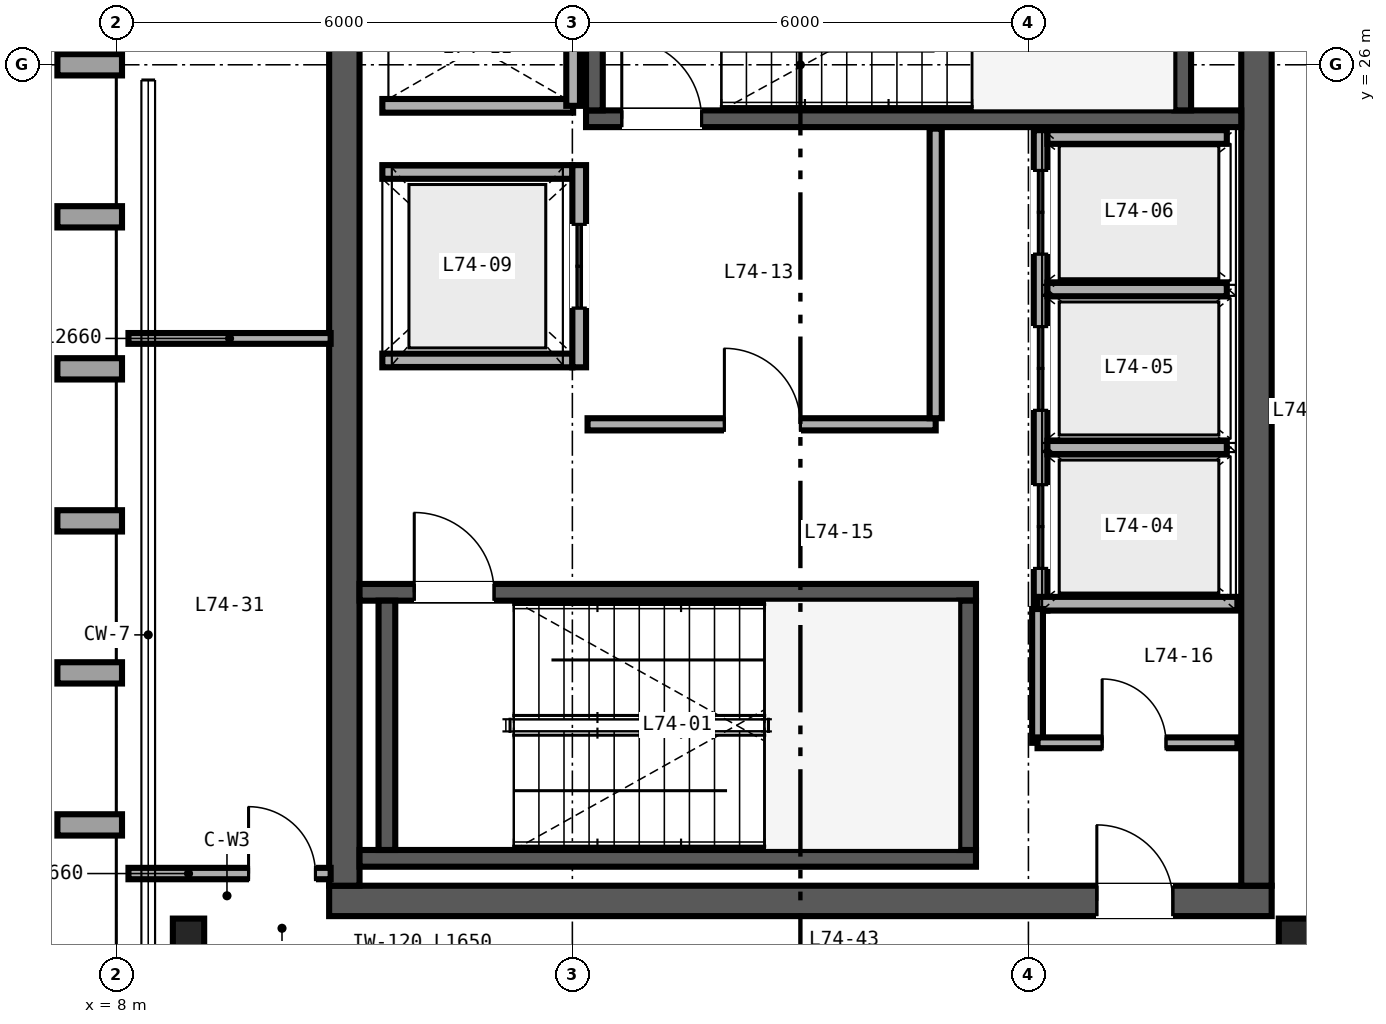
"""IFC4 building model, lengths in metres.
Left out: names, types, materials, properties, quantities, classifications, styles, units other than length and angle.
Written with IfcOpenShell. Run it as: python <this file> out.ifc"""

import sys

from ifc_helpers import new_model, si_unit, direction, frame, frame_2d, origin, origin_2d, place, context, subcontext, project, spatial, rectangle, i_section, extrude, source, transform, mapped, element, fill, save


model = new_model("IFC4")
c1 = context("Model", 3, precision=1e-05, world=origin(), true_north=direction((0.0, 1.0)))
c2 = subcontext(c1, "Body", "Model", "MODEL_VIEW")
j1 = project(units=[si_unit("LENGTHUNIT", "METRE"), si_unit("PLANEANGLEUNIT", "RADIAN")], contexts=[c1])
p1 = place(None, origin())
s1 = spatial("IfcSite", under=j1, at=p1, CompositionType="ELEMENT")
p2 = place(p1, origin())
s2 = spatial("IfcBuilding", under=s1, at=p2, CompositionType="ELEMENT")
p3 = place(p2, frame((0.0, 0.0, 290.4)))
s3 = spatial("IfcBuildingStorey", under=s2, at=p3, CompositionType="ELEMENT", Elevation=290.4)
p4 = place(p3, frame((10.8, 15.0, 0.0), z_axis=(0.0, 0.0, 1.0), x_axis=(1.0, 0.0, 0.0)))
e1 = element("IfcWall", 1, at=p4, inside=s3, PredefinedType="SHEAR", context=c2, shape_type="SweptSolid", body=[
    extrude(rectangle(XDim=12.4, YDim=0.4, at=frame_2d((6.2, 0.0))), origin(), (0.0, 0.0, 1.0), 3.38),
])
p5 = place(p4, frame((10.1, 0.0, 0.0)))
e2 = element("IfcOpeningElement", 2, at=p5, cuts=e1, PredefinedType="OPENING", context=c2, shape_type="SweptSolid", body=[
    extrude(rectangle(XDim=1.0, YDim=2.15, at=frame_2d((0.5, 1.075))), frame((0.0, 0.21, 0.0), z_axis=(0.0, -1.0, 0.0), x_axis=(1.0, 0.0, 0.0)), (0.0, 0.0, 1.0), 0.42),
])
for number, where, z_axis, x_axis in (
    (3, (11.0, 15.2, 0.0), (0.0, 0.0, 1.0), (0.0, 1.0, 0.0)),
    (4, (23.0, 15.2, 0.0), (0.0, 0.0, 1.0), (0.0, 1.0, 0.0)),
):
    element("IfcWall", number, at=place(p3, frame(where, z_axis=z_axis, x_axis=x_axis)), inside=s3, PredefinedType="SHEAR", context=c2, shape_type="SweptSolid", body=[
        extrude(rectangle(XDim=21.6, YDim=0.4, at=frame_2d((10.8, 0.0))), origin(), (0.0, 0.0, 1.0), 3.38),
    ])
p6 = place(p3, frame((11.2, 15.56, 0.0), z_axis=(0.0, 0.0, 1.0), x_axis=(1.0, 0.0, 0.0)))
e5 = element("IfcWall", 5, at=p6, inside=s3, PredefinedType="SHEAR", context=c2, shape_type="SweptSolid", body=[
    extrude(rectangle(XDim=8.11, YDim=0.22, at=frame_2d((4.055, 0.0))), origin(), (0.0, 0.0, 1.0), 3.4),
])
p7 = place(p3, frame((11.2, 19.06, 0.0), z_axis=(0.0, 0.0, 1.0), x_axis=(1.0, 0.0, 0.0)))
e6 = element("IfcWall", 6, at=p7, inside=s3, PredefinedType="SHEAR", context=c2, shape_type="SweptSolid", body=[
    extrude(rectangle(XDim=8.11, YDim=0.22, at=frame_2d((4.055, 0.0))), origin(), (0.0, 0.0, 1.0), 3.4),
])
p8 = place(p7, frame((0.72, 0.0, 0.0)))
e7 = element("IfcOpeningElement", 7, at=p8, cuts=e6, PredefinedType="OPENING", context=c2, shape_type="SweptSolid", body=[
    extrude(rectangle(XDim=1.05, YDim=2.15, at=frame_2d((0.525, 1.075))), frame((0.0, 0.12, 0.0), z_axis=(0.0, -1.0, 0.0), x_axis=(1.0, 0.0, 0.0)), (0.0, 0.0, 1.0), 0.24),
])
for number, where, z_axis, x_axis in (
    (8, (11.56, 15.67, 0.0), (0.0, 0.0, 1.0), (0.0, 1.0, 0.0)),
    (9, (19.2, 15.67, 0.0), (0.0, 0.0, 1.0), (0.0, 1.0, 0.0)),
):
    element("IfcWall", number, at=place(p3, frame(where, z_axis=z_axis, x_axis=x_axis)), inside=s3, PredefinedType="SHEAR", context=c2, shape_type="SweptSolid", body=[
        extrude(rectangle(XDim=3.28, YDim=0.22, at=frame_2d((1.64, 0.0))), origin(), (0.0, 0.0, 1.0), 3.4),
    ])
p9 = place(p3, frame((14.18, 25.29, 0.0), z_axis=(0.0, 0.0, 1.0), x_axis=(1.0, 0.0, 0.0)))
e10 = element("IfcWall", 10, at=p9, inside=s3, PredefinedType="SHEAR", context=c2, shape_type="SweptSolid", body=[
    extrude(rectangle(XDim=8.62, YDim=0.22, at=frame_2d((4.31, 0.0))), origin(), (0.0, 0.0, 1.0), 3.4),
])
p10 = place(p9, frame((0.47, 0.0, 0.0)))
e11 = element("IfcOpeningElement", 11, at=p10, cuts=e10, PredefinedType="OPENING", context=c2, shape_type="SweptSolid", body=[
    extrude(rectangle(XDim=1.05, YDim=2.15, at=frame_2d((0.525, 1.075))), frame((0.0, 0.12, 0.0), z_axis=(0.0, -1.0, 0.0), x_axis=(1.0, 0.0, 0.0)), (0.0, 0.0, 1.0), 0.24),
])
for number, where, z_axis, x_axis in (
    (12, (14.29, 25.4, 0.0), (0.0, 0.0, 1.0), (0.0, 1.0, 0.0)),
    (13, (22.03, 25.4, 0.0), (0.0, 0.0, 1.0), (0.0, 1.0, 0.0)),
):
    element("IfcWall", number, at=place(p3, frame(where, z_axis=z_axis, x_axis=x_axis)), inside=s3, PredefinedType="SHEAR", context=c2, shape_type="SweptSolid", body=[
        extrude(rectangle(XDim=3.28, YDim=0.22, at=frame_2d((1.64, 0.0))), origin(), (0.0, 0.0, 1.0), 3.4),
    ])
m1 = source(origin(), c2, "Body", "SweptSolid", [
    extrude(i_section(OverallWidth=0.412, OverallDepth=0.435, WebThickness=0.036, FlangeThickness=0.057, FilletRadius=0.025, at=origin_2d()), origin(), (0.0, 0.0, 1.0), 3.38),
])
for number, where, z_axis, x_axis in (
    (14, (8.95, 14.55, 0.0), (0.0, 0.0, 1.0), (1.0, 0.0, 0.0)),
    (15, (23.5, 14.55, 0.0), (0.0, 0.0, 1.0), (1.0, 0.0, 0.0)),
):
    element("IfcColumn", number, at=place(p3, frame(where, z_axis=z_axis, x_axis=x_axis)), inside=s3, PredefinedType="COLUMN", context=c2, shape_type="MappedRepresentation", body=[
        mapped(m1, transform((0.0, 0.0, 0.0), scale=1.0)),
    ])
p11 = place(p3, frame((20.16, 18.82, 0.0), z_axis=(0.0, 0.0, 1.0), x_axis=(0.0, 1.0, 0.0)))
e16 = element("IfcWall", 16, at=p11, inside=s3, PredefinedType="SOLIDWALL", context=c2, shape_type="SweptSolid", body=[
    extrude(rectangle(XDim=6.32, YDim=0.18, at=frame_2d((3.16, 0.0))), origin(), (0.0, 0.0, 1.0), 2.48),
])
p12 = place(p11, frame((0.555, 0.0, 0.0)))
e17 = element("IfcOpeningElement", 17, at=p12, cuts=e16, PredefinedType="OPENING", context=c2, shape_type="SweptSolid", body=[
    extrude(rectangle(XDim=1.1, YDim=2.2, at=frame_2d((0.55, 1.1))), frame((0.0, 0.1, 0.0), z_axis=(0.0, -1.0, 0.0), x_axis=(1.0, 0.0, 0.0)), (0.0, 0.0, 1.0), 0.2),
])
p13 = place(p11, frame((2.635, 0.0, 0.0)))
e18 = element("IfcOpeningElement", 18, at=p13, cuts=e16, PredefinedType="OPENING", context=c2, shape_type="SweptSolid", body=[
    extrude(rectangle(XDim=1.1, YDim=2.2, at=frame_2d((0.55, 1.1))), frame((0.0, 0.1, 0.0), z_axis=(0.0, -1.0, 0.0), x_axis=(1.0, 0.0, 0.0)), (0.0, 0.0, 1.0), 0.2),
])
p14 = place(p11, frame((4.69, 0.0, 0.0)))
e19 = element("IfcOpeningElement", 19, at=p14, cuts=e16, PredefinedType="OPENING", context=c2, shape_type="SweptSolid", body=[
    extrude(rectangle(XDim=1.1, YDim=2.2, at=frame_2d((0.55, 1.1))), frame((0.0, 0.1, 0.0), z_axis=(0.0, -1.0, 0.0), x_axis=(1.0, 0.0, 0.0)), (0.0, 0.0, 1.0), 0.2),
])
p15 = place(p3, frame((20.12, 18.91, 0.0), z_axis=(0.0, 0.0, 1.0), x_axis=(1.0, 0.0, 0.0)))
e20 = element("IfcWall", 20, at=p15, inside=s3, PredefinedType="SOLIDWALL", context=c2, shape_type="SweptSolid", body=[
    extrude(rectangle(XDim=2.63, YDim=0.18, at=frame_2d((1.315, 0.0))), origin(), (0.0, 0.0, 1.0), 3.38),
])
p16 = place(p3, frame((20.25, 25.05, 0.0), z_axis=(0.0, 0.0, 1.0), x_axis=(1.0, 0.0, 0.0)))
e21 = element("IfcWall", 21, at=p16, inside=s3, PredefinedType="SOLIDWALL", context=c2, shape_type="SweptSolid", body=[
    extrude(rectangle(XDim=2.36, YDim=0.18, at=frame_2d((1.18, 0.0))), origin(), (0.0, 0.0, 1.0), 3.38),
])
p17 = place(p3, frame((20.25, 20.965, 0.0), z_axis=(0.0, 0.0, 1.0), x_axis=(1.0, 0.0, 0.0)))
e22 = element("IfcWall", 22, at=p17, inside=s3, PredefinedType="SOLIDWALL", context=c2, shape_type="SweptSolid", body=[
    extrude(rectangle(XDim=2.36, YDim=0.18, at=frame_2d((1.18, 0.0))), origin(), (0.0, 0.0, 1.0), 2.48),
])
p18 = place(p3, frame((20.25, 23.045, 0.0), z_axis=(0.0, 0.0, 1.0), x_axis=(1.0, 0.0, 0.0)))
e23 = element("IfcWall", 23, at=p18, inside=s3, PredefinedType="SOLIDWALL", context=c2, shape_type="SweptSolid", body=[
    extrude(rectangle(XDim=2.36, YDim=0.18, at=frame_2d((1.18, 0.0))), origin(), (0.0, 0.0, 1.0), 3.38),
])
for number, where, z_axis, x_axis in (
    (24, (11.5, 22.11, 0.0), (0.0, 0.0, 1.0), (1.0, 0.0, 0.0)),
    (25, (11.5, 24.59, 0.0), (0.0, 0.0, 1.0), (1.0, 0.0, 0.0)),
):
    element("IfcWall", number, at=place(p3, frame(where, z_axis=z_axis, x_axis=x_axis)), inside=s3, PredefinedType="SOLIDWALL", context=c2, shape_type="SweptSolid", body=[
        extrude(rectangle(XDim=2.5, YDim=0.18, at=frame_2d((1.25, 0.0))), origin(), (0.0, 0.0, 1.0), 3.38),
    ])
p19 = place(p3, frame((14.09, 22.02, 0.0), z_axis=(0.0, 0.0, 1.0), x_axis=(0.0, 1.0, 0.0)))
e26 = element("IfcWall", 26, at=p19, inside=s3, PredefinedType="SOLIDWALL", context=c2, shape_type="SweptSolid", body=[
    extrude(rectangle(XDim=2.66, YDim=0.18, at=frame_2d((1.33, 0.0))), origin(), (0.0, 0.0, 1.0), 3.38),
])
p20 = place(p19, frame((0.78, 0.0, 0.0)))
e27 = element("IfcOpeningElement", 27, at=p20, cuts=e26, PredefinedType="OPENING", context=c2, shape_type="SweptSolid", body=[
    extrude(rectangle(XDim=1.1, YDim=2.2, at=frame_2d((0.55, 1.1))), frame((0.0, 0.1, 0.0), z_axis=(0.0, -1.0, 0.0), x_axis=(1.0, 0.0, 0.0)), (0.0, 0.0, 1.0), 0.2),
])
p21 = place(p3, frame((11.5, 25.46, 0.0), z_axis=(0.0, 0.0, 1.0), x_axis=(1.0, 0.0, 0.0)))
e28 = element("IfcWall", 28, at=p21, inside=s3, PredefinedType="SOLIDWALL", context=c2, shape_type="SweptSolid", body=[
    extrude(rectangle(XDim=2.51, YDim=0.18, at=frame_2d((1.255, 0.0))), origin(), (0.0, 0.0, 1.0), 3.38),
])
p22 = place(p3, frame((14.01, 25.46, 0.0), z_axis=(0.0, 0.0, 1.0), x_axis=(0.0, 1.0, 0.0)))
e29 = element("IfcWall", 29, at=p22, inside=s3, PredefinedType="SOLIDWALL", context=c2, shape_type="SweptSolid", body=[
    extrude(rectangle(XDim=3.08, YDim=0.18, at=frame_2d((1.54, 0.0))), origin(), (0.0, 0.0, 1.0), 3.38),
])
p23 = place(p3, frame((14.2, 21.27, 0.0), z_axis=(0.0, 0.0, 1.0), x_axis=(1.0, 0.0, 0.0)))
e30 = element("IfcWall", 30, at=p23, inside=s3, PredefinedType="PARTITIONING", context=c2, shape_type="SweptSolid", body=[
    extrude(rectangle(XDim=4.58, YDim=0.16, at=frame_2d((2.29, 0.0))), origin(), (0.0, 0.0, 1.0), 3.38),
])
p24 = place(p23, frame((1.8, 0.0, 0.0)))
e31 = element("IfcOpeningElement", 31, at=p24, cuts=e30, PredefinedType="OPENING", context=c2, shape_type="SweptSolid", body=[
    extrude(rectangle(XDim=1.0, YDim=2.15, at=frame_2d((0.5, 1.075))), frame((0.0, 0.09, 0.0), z_axis=(0.0, -1.0, 0.0), x_axis=(1.0, 0.0, 0.0)), (0.0, 0.0, 1.0), 0.18),
])
p25 = place(p3, frame((18.78, 21.35, 0.0), z_axis=(0.0, 0.0, 1.0), x_axis=(0.0, 1.0, 0.0)))
e32 = element("IfcWall", 32, at=p25, inside=s3, PredefinedType="PARTITIONING", context=c2, shape_type="SweptSolid", body=[
    extrude(rectangle(XDim=3.81, YDim=0.16, at=frame_2d((1.905, 0.0))), origin(), (0.0, 0.0, 1.0), 3.38),
])
p26 = place(p3, frame((20.12, 17.08, 0.0), z_axis=(0.0, 0.0, 1.0), x_axis=(0.0, 1.0, 0.0)))
e33 = element("IfcWall", 33, at=p26, inside=s3, PredefinedType="PARTITIONING", context=c2, shape_type="SweptSolid", body=[
    extrude(rectangle(XDim=1.76, YDim=0.142, at=frame_2d((0.88, 0.0))), origin(), (0.0, 0.0, 1.0), 3.38),
])
p27 = place(p3, frame((20.12, 17.08, 0.0), z_axis=(0.0, 0.0, 1.0), x_axis=(1.0, 0.0, 0.0)))
e34 = element("IfcWall", 34, at=p27, inside=s3, PredefinedType="PARTITIONING", context=c2, shape_type="SweptSolid", body=[
    extrude(rectangle(XDim=2.63, YDim=0.142, at=frame_2d((1.315, 0.0))), origin(), (0.0, 0.0, 1.0), 3.38),
])
p28 = place(p27, frame((0.85, 0.0, 0.0)))
e35 = element("IfcOpeningElement", 35, at=p28, cuts=e34, PredefinedType="OPENING", context=c2, shape_type="SweptSolid", body=[
    extrude(rectangle(XDim=0.84, YDim=2.1, at=frame_2d((0.42, 1.05))), frame((0.0, 0.081, 0.0), z_axis=(0.0, -1.0, 0.0), x_axis=(1.0, 0.0, 0.0)), (0.0, 0.0, 1.0), 0.162),
])
p29 = place(p3, frame((8.16, 15.36, 0.0), z_axis=(0.0, 0.0, 1.0), x_axis=(1.0, 0.0, 0.0)))
e36 = element("IfcWall", 36, at=p29, inside=s3, PredefinedType="PARTITIONING", context=c2, shape_type="SweptSolid", body=[
    extrude(rectangle(XDim=2.66, YDim=0.15, at=frame_2d((1.33, 0.0))), origin(), (0.0, 0.0, 1.0), 2.601),
])
p30 = place(p29, frame((1.58, 0.0, 0.0)))
e37 = element("IfcOpeningElement", 37, at=p30, cuts=e36, PredefinedType="OPENING", context=c2, shape_type="SweptSolid", body=[
    extrude(rectangle(XDim=0.88, YDim=2.15, at=frame_2d((0.44, 1.075))), frame((0.0, 0.085, 0.0), z_axis=(0.0, -1.0, 0.0), x_axis=(1.0, 0.0, 0.0)), (0.0, 0.0, 1.0), 0.17),
])
p31 = place(p3, frame((8.16, 22.4, 0.0), z_axis=(0.0, 0.0, 1.0), x_axis=(1.0, 0.0, 0.0)))
e38 = element("IfcWall", 38, at=p31, inside=s3, PredefinedType="PARTITIONING", context=c2, shape_type="SweptSolid", body=[
    extrude(rectangle(XDim=2.66, YDim=0.142, at=frame_2d((1.33, 0.0))), origin(), (0.0, 0.0, 1.0), 2.601),
])
m2 = source(origin(), c2, "Body", "SweptSolid", [
    extrude(rectangle(XDim=1.05, YDim=2.15, at=frame_2d((0.525, 1.075))), frame((0.0, 0.025, 0.0), z_axis=(0.0, -1.0, 0.0), x_axis=(1.0, 0.0, 0.0)), (0.0, 0.0, 1.0), 0.05),
])
p32 = place(p8, origin())
e39 = element("IfcDoor", 39, at=p32, inside=s3, OperationType="SINGLE_SWING_LEFT", PredefinedType="DOOR", context=c2, shape_type="MappedRepresentation", body=[
    mapped(m2, transform((0.0, 0.0, 0.0), scale=1.0)),
])
fill(e7, e39)
p33 = place(p10, origin())
e40 = element("IfcDoor", 40, at=p33, inside=s3, OperationType="SINGLE_SWING_LEFT", PredefinedType="DOOR", context=c2, shape_type="MappedRepresentation", body=[
    mapped(m2, transform((0.0, 0.0, 0.0), scale=1.0)),
])
fill(e11, e40)
m3 = source(origin(), c2, "Body", "SweptSolid", [
    extrude(rectangle(XDim=1.1, YDim=2.2, at=frame_2d((0.55, 1.1))), frame((0.0, 0.025, 0.0), z_axis=(0.0, -1.0, 0.0), x_axis=(1.0, 0.0, 0.0)), (0.0, 0.0, 1.0), 0.05),
])
p34 = place(p12, origin())
e41 = element("IfcDoor", 41, at=p34, inside=s3, OperationType="DOUBLE_DOOR_SLIDING", PredefinedType="DOOR", context=c2, shape_type="MappedRepresentation", body=[
    mapped(m3, transform((0.0, 0.0, 0.0), scale=1.0)),
])
fill(e17, e41)
p35 = place(p13, origin())
e42 = element("IfcDoor", 42, at=p35, inside=s3, OperationType="DOUBLE_DOOR_SLIDING", PredefinedType="DOOR", context=c2, shape_type="MappedRepresentation", body=[
    mapped(m3, transform((0.0, 0.0, 0.0), scale=1.0)),
])
fill(e18, e42)
p36 = place(p14, origin())
e43 = element("IfcDoor", 43, at=p36, inside=s3, OperationType="DOUBLE_DOOR_SLIDING", PredefinedType="DOOR", context=c2, shape_type="MappedRepresentation", body=[
    mapped(m3, transform((0.0, 0.0, 0.0), scale=1.0)),
])
fill(e19, e43)
p37 = place(p20, origin())
e44 = element("IfcDoor", 44, at=p37, inside=s3, OperationType="DOUBLE_DOOR_SLIDING", PredefinedType="DOOR", context=c2, shape_type="MappedRepresentation", body=[
    mapped(m3, transform((0.0, 0.0, 0.0), scale=1.0)),
])
fill(e27, e44)
m4 = source(origin(), c2, "Body", "SweptSolid", [
    extrude(rectangle(XDim=1.0, YDim=2.15, at=frame_2d((0.5, 1.075))), frame((0.0, 0.025, 0.0), z_axis=(0.0, -1.0, 0.0), x_axis=(1.0, 0.0, 0.0)), (0.0, 0.0, 1.0), 0.05),
])
p38 = place(p24, origin())
e45 = element("IfcDoor", 45, at=p38, inside=s3, OperationType="SINGLE_SWING_LEFT", PredefinedType="DOOR", context=c2, shape_type="MappedRepresentation", body=[
    mapped(m4, transform((0.0, 0.0, 0.0), scale=1.0)),
])
fill(e31, e45)
m5 = source(origin(), c2, "Body", "SweptSolid", [
    extrude(rectangle(XDim=0.84, YDim=2.1, at=frame_2d((0.42, 1.05))), frame((0.0, 0.025, 0.0), z_axis=(0.0, -1.0, 0.0), x_axis=(1.0, 0.0, 0.0)), (0.0, 0.0, 1.0), 0.05),
])
p39 = place(p28, origin())
e46 = element("IfcDoor", 46, at=p39, inside=s3, OperationType="SINGLE_SWING_LEFT", PredefinedType="DOOR", context=c2, shape_type="MappedRepresentation", body=[
    mapped(m5, transform((0.0, 0.0, 0.0), scale=1.0)),
])
fill(e35, e46)
p40 = place(p5, origin())
e47 = element("IfcDoor", 47, at=p40, inside=s3, OperationType="SINGLE_SWING_LEFT", PredefinedType="DOOR", context=c2, shape_type="MappedRepresentation", body=[
    mapped(m4, transform((0.0, 0.0, 0.0), scale=1.0)),
])
fill(e2, e47)
m6 = source(origin(), c2, "Body", "SweptSolid", [
    extrude(rectangle(XDim=0.88, YDim=2.15, at=frame_2d((0.44, 1.075))), frame((0.0, 0.025, 0.0), z_axis=(0.0, -1.0, 0.0), x_axis=(1.0, 0.0, 0.0)), (0.0, 0.0, 1.0), 0.05),
])
p41 = place(p30, origin())
e48 = element("IfcDoor", 48, at=p41, inside=s3, OperationType="SINGLE_SWING_LEFT", PredefinedType="DOOR", context=c2, shape_type="MappedRepresentation", body=[
    mapped(m6, transform((0.0, 0.0, 0.0), scale=1.0)),
])
fill(e37, e48)
save(model, sys.argv[1])
